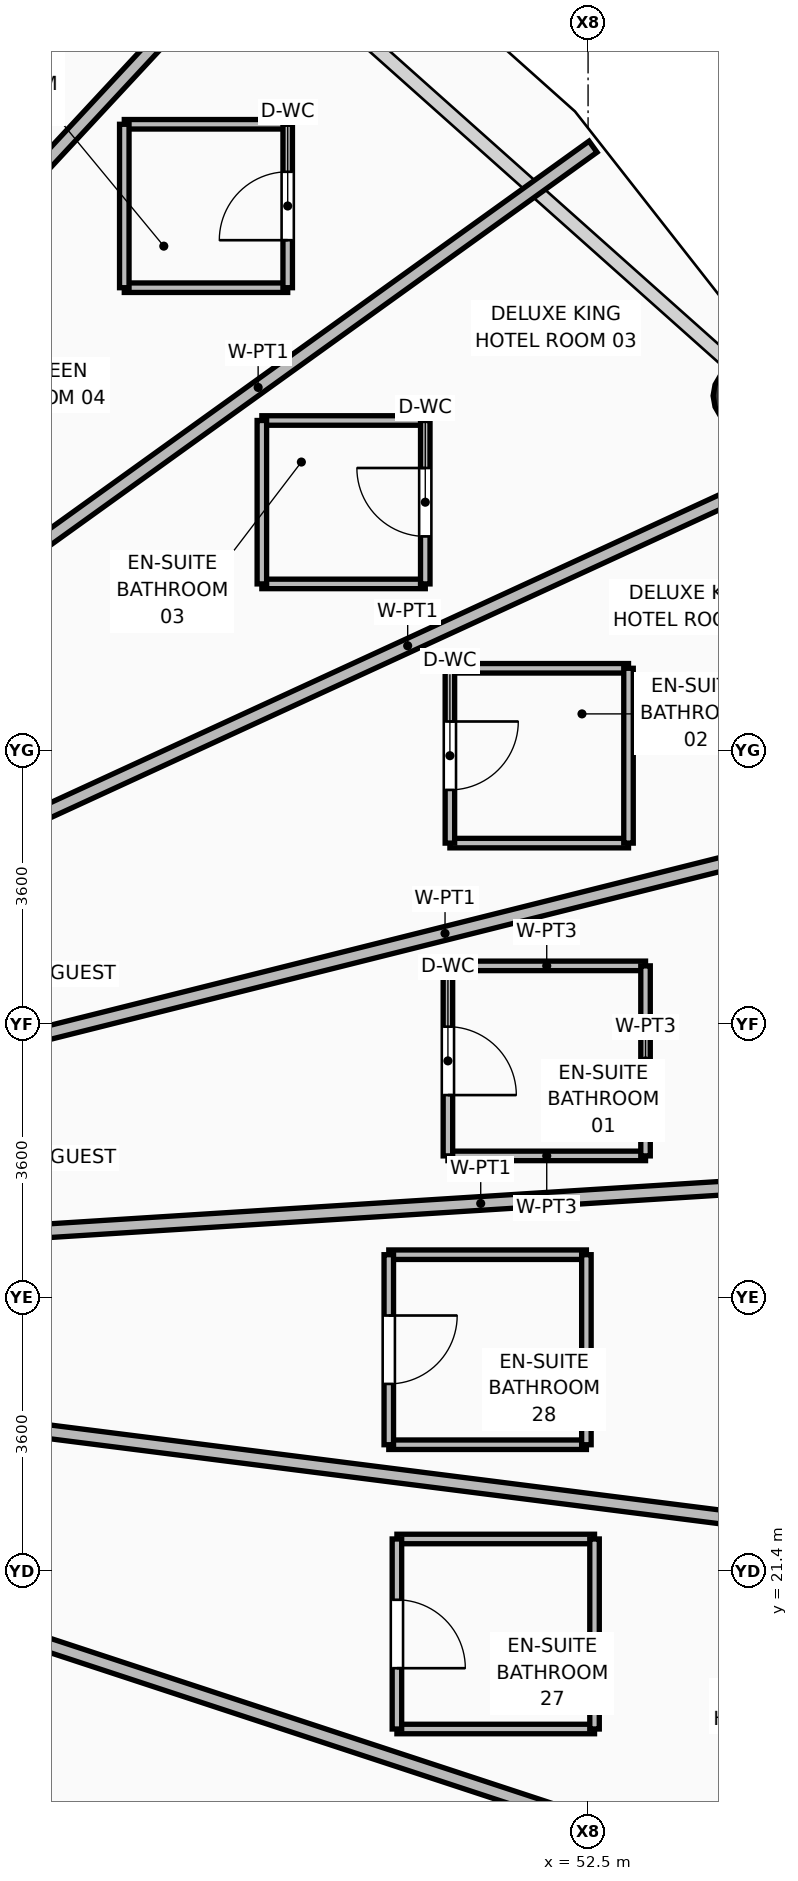
"""IFC4 building model, lengths in metres.
Left out: names, types, materials, properties, quantities, classifications, styles, units other than length and angle.
Written with IfcOpenShell. Run it as: python <this file> out.ifc"""

import sys

from ifc_helpers import new_model, si_unit, direction, frame, frame_2d, origin, origin_2d, place, context, subcontext, project, spatial, rectangle, hollow_circle, extrude, element, fill, save


model = new_model("IFC4")
c1 = context("Model", 3, precision=1e-05, world=origin(), true_north=direction((0.0, 1.0)))
c2 = subcontext(c1, "Body", "Model", "MODEL_VIEW")
j1 = project(units=[si_unit("LENGTHUNIT", "METRE"), si_unit("PLANEANGLEUNIT", "RADIAN")], contexts=[c1])
p1 = place(None, origin())
s1 = spatial("IfcSite", under=j1, at=p1, CompositionType="ELEMENT")
p2 = place(p1, origin())
s2 = spatial("IfcBuilding", under=s1, at=p2, CompositionType="ELEMENT")
p3 = place(p2, frame((0.0, 0.0, 53.25)))
s3 = spatial("IfcBuildingStorey", under=s2, at=p3, CompositionType="ELEMENT", Elevation=53.25)
p4 = place(p3, frame((54.57, 36.863, 0.0), z_axis=(0.192223999714, 0.099016391655, 0.976343017652), x_axis=(-0.45792701067, 0.888989793473, 0.0)))
e1 = element("IfcColumn", 1, at=p4, inside=s3, PredefinedType="COLUMN", context=c2, shape_type="SweptSolid", body=[
    extrude(hollow_circle(Radius=0.425, WallThickness=0.04, at=origin_2d()), origin(), (0.0, 0.0, 1.0), 3.656),
])
p5 = place(p3, frame((43.753, 25.774, 0.0), z_axis=(0.0, 0.0, 1.0), x_axis=(0.998009231822, 0.063068004547, 0.0)))
e2 = element("IfcWall", 2, at=p5, inside=s3, PredefinedType="PARTITIONING", context=c2, shape_type="SweptSolid", body=[
    extrude(rectangle(XDim=14.698, YDim=0.18, at=frame_2d((7.349, 0.0))), origin(), (0.0, 0.0, 1.0), 2.775),
])
p6 = place(p3, frame((43.753, 28.07, 0.0), z_axis=(0.0, 0.0, 1.0), x_axis=(0.970018590768, 0.243030725558, 0.0)))
e3 = element("IfcWall", 3, at=p6, inside=s3, PredefinedType="PARTITIONING", context=c2, shape_type="SweptSolid", body=[
    extrude(rectangle(XDim=14.154, YDim=0.18, at=frame_2d((7.077, 0.0))), origin(), (0.0, 0.0, 1.0), 2.775),
])
p7 = place(p3, frame((43.753, 30.64, 0.0), z_axis=(0.0, 0.0, 1.0), x_axis=(0.908354532473, 0.418200960466, 0.0)))
e4 = element("IfcWall", 4, at=p7, inside=s3, PredefinedType="PARTITIONING", context=c2, shape_type="SweptSolid", body=[
    extrude(rectangle(XDim=12.934, YDim=0.18, at=frame_2d((6.467, 0.0))), origin(), (0.0, 0.0, 1.0), 2.775),
])
p8 = place(p3, frame((43.753, 33.806, 0.0), z_axis=(0.0, 0.0, 1.0), x_axis=(0.812000044836, 0.583657371397, 0.0)))
e5 = element("IfcWall", 5, at=p8, inside=s3, PredefinedType="PARTITIONING", context=c2, shape_type="SweptSolid", body=[
    extrude(rectangle(XDim=10.852, YDim=0.18, at=frame_2d((5.426, 0.0))), origin(), (0.0, 0.0, 1.0), 2.775),
])
p9 = place(p3, frame((40.882, 35.103, 0.0), z_axis=(0.0, 0.0, 1.0), x_axis=(0.680551186201, 0.732700541122, 0.0)))
e6 = element("IfcWall", 6, at=p9, inside=s3, PredefinedType="PARTITIONING", context=c2, shape_type="SweptSolid", body=[
    extrude(rectangle(XDim=11.601, YDim=0.18, at=frame_2d((5.8, 0.0))), origin(), (0.0, 0.0, 1.0), 2.775),
])
p10 = place(p3, frame((43.753, 20.971, 0.0), z_axis=(0.0, 0.0, 1.0), x_axis=(0.949941417746, -0.312428076284, 0.0)))
e7 = element("IfcWall", 7, at=p10, inside=s3, PredefinedType="PARTITIONING", context=c2, shape_type="SweptSolid", body=[
    extrude(rectangle(XDim=13.849, YDim=0.18, at=frame_2d((6.925, 0.0))), origin(), (0.0, 0.0, 1.0), 2.775),
])
p11 = place(p3, frame((43.753, 23.444, 0.0), z_axis=(0.0, 0.0, 1.0), x_axis=(0.992038929139, -0.125931580921, 0.0)))
e8 = element("IfcWall", 8, at=p11, inside=s3, PredefinedType="PARTITIONING", context=c2, shape_type="SweptSolid", body=[
    extrude(rectangle(XDim=14.62, YDim=0.18, at=frame_2d((7.31, 0.0))), origin(), (0.0, 0.0, 1.0), 2.775),
])
for number, where, z_axis, x_axis in (
    (9, (50.656, 26.863, 0.0), (0.0, 0.0, 1.0), (1.0, 0.0, 0.0)),
    (10, (50.656, 29.363, 0.0), (0.0, 0.0, 1.0), (1.0, 0.0, 0.0)),
):
    element("IfcWall", number, at=place(p3, frame(where, z_axis=z_axis, x_axis=x_axis)), inside=s3, PredefinedType="PARTITIONING", context=c2, shape_type="SweptSolid", body=[
        extrude(rectangle(XDim=2.6, YDim=0.125, at=frame_2d((1.3, 0.0))), origin(), (0.0, 0.0, 1.0), 3.55),
    ])
p12 = place(p3, frame((50.656, 26.863, 0.0), z_axis=(0.0, 0.0, 1.0), x_axis=(0.0, 1.0, 0.0)))
e11 = element("IfcWall", 11, at=p12, inside=s3, PredefinedType="PARTITIONING", context=c2, shape_type="SweptSolid", body=[
    extrude(rectangle(XDim=2.5, YDim=0.125, at=frame_2d((1.25, 0.0))), origin(), (0.0, 0.0, 1.0), 3.55),
])
p13 = place(p12, frame((0.8, 0.0, 0.0)))
e12 = element("IfcOpeningElement", 12, at=p13, cuts=e11, PredefinedType="OPENING", context=c2, shape_type="SweptSolid", body=[
    extrude(rectangle(XDim=0.9, YDim=2.1, at=frame_2d((0.45, 1.05))), frame((0.0, 0.073, 0.0), z_axis=(0.0, -1.0, 0.0), x_axis=(1.0, 0.0, 0.0)), (0.0, 0.0, 1.0), 0.145),
])
p14 = place(p3, frame((53.256, 26.863, 0.0), z_axis=(0.0, 0.0, 1.0), x_axis=(0.0, 1.0, 0.0)))
e13 = element("IfcWall", 13, at=p14, inside=s3, PredefinedType="PARTITIONING", context=c2, shape_type="SweptSolid", body=[
    extrude(rectangle(XDim=2.5, YDim=0.125, at=frame_2d((1.25, 0.0))), origin(), (0.0, 0.0, 1.0), 3.55),
])
for number, where, z_axis, x_axis in (
    (14, (50.682, 30.978, 0.0), (0.0, 0.0, 1.0), (1.0, 0.0, 0.0)),
    (15, (50.682, 33.278, 0.0), (0.0, 0.0, 1.0), (1.0, 0.0, 0.0)),
):
    element("IfcWall", number, at=place(p3, frame(where, z_axis=z_axis, x_axis=x_axis)), inside=s3, PredefinedType="PARTITIONING", context=c2, shape_type="SweptSolid", body=[
        extrude(rectangle(XDim=2.35, YDim=0.125, at=frame_2d((1.175, 0.0))), origin(), (0.0, 0.0, 1.0), 3.55),
    ])
p15 = place(p3, frame((50.682, 30.978, 0.0), z_axis=(0.0, 0.0, 1.0), x_axis=(0.0, 1.0, 0.0)))
e16 = element("IfcWall", 16, at=p15, inside=s3, PredefinedType="PARTITIONING", context=c2, shape_type="SweptSolid", body=[
    extrude(rectangle(XDim=2.3, YDim=0.125, at=frame_2d((1.15, 0.0))), origin(), (0.0, 0.0, 1.0), 3.55),
])
p16 = place(p15, frame((0.7, 0.0, 0.0)))
e17 = element("IfcOpeningElement", 17, at=p16, cuts=e16, PredefinedType="OPENING", context=c2, shape_type="SweptSolid", body=[
    extrude(rectangle(XDim=0.9, YDim=2.1, at=frame_2d((0.45, 1.05))), frame((0.0, 0.073, 0.0), z_axis=(0.0, -1.0, 0.0), x_axis=(1.0, 0.0, 0.0)), (0.0, 0.0, 1.0), 0.145),
])
p17 = place(p3, frame((53.032, 30.978, 0.0), z_axis=(0.0, 0.0, 1.0), x_axis=(0.0, 1.0, 0.0)))
e18 = element("IfcWall", 18, at=p17, inside=s3, PredefinedType="PARTITIONING", context=c2, shape_type="SweptSolid", body=[
    extrude(rectangle(XDim=2.3, YDim=0.125, at=frame_2d((1.15, 0.0))), origin(), (0.0, 0.0, 1.0), 3.55),
])
for number, where, z_axis, x_axis in (
    (19, (48.208, 34.388, 0.0), (0.0, 0.0, 1.0), (1.0, 0.0, 0.0)),
    (20, (48.208, 36.538, 0.0), (0.0, 0.0, 1.0), (1.0, 0.0, 0.0)),
):
    element("IfcWall", number, at=place(p3, frame(where, z_axis=z_axis, x_axis=x_axis)), inside=s3, PredefinedType="PARTITIONING", context=c2, shape_type="SweptSolid", body=[
        extrude(rectangle(XDim=2.15, YDim=0.125, at=frame_2d((1.075, 0.0))), origin(), (0.0, 0.0, 1.0), 3.55),
    ])
p18 = place(p3, frame((48.208, 34.388, 0.0), z_axis=(0.0, 0.0, 1.0), x_axis=(0.0, 1.0, 0.0)))
e21 = element("IfcWall", 21, at=p18, inside=s3, PredefinedType="PARTITIONING", context=c2, shape_type="SweptSolid", body=[
    extrude(rectangle(XDim=2.15, YDim=0.125, at=frame_2d((1.075, 0.0))), origin(), (0.0, 0.0, 1.0), 2.928),
])
p19 = place(p3, frame((50.358, 34.388, 0.0), z_axis=(0.0, 0.0, 1.0), x_axis=(0.0, 1.0, 0.0)))
e22 = element("IfcWall", 22, at=p19, inside=s3, PredefinedType="PARTITIONING", context=c2, shape_type="SweptSolid", body=[
    extrude(rectangle(XDim=2.15, YDim=0.125, at=frame_2d((1.075, 0.0))), origin(), (0.0, 0.0, 1.0), 2.928),
])
p20 = place(p19, frame((0.625, 0.0, 0.0)))
e23 = element("IfcOpeningElement", 23, at=p20, cuts=e22, PredefinedType="OPENING", context=c2, shape_type="SweptSolid", body=[
    extrude(rectangle(XDim=0.9, YDim=2.1, at=frame_2d((0.45, 1.05))), frame((0.0, 0.073, 0.0), z_axis=(0.0, -1.0, 0.0), x_axis=(1.0, 0.0, 0.0)), (0.0, 0.0, 1.0), 0.145),
])
for number, where, z_axis, x_axis in (
    (24, (46.398, 38.285, 0.0), (0.0, 0.0, 1.0), (1.0, 0.0, 0.0)),
    (25, (46.398, 40.435, 0.0), (0.0, 0.0, 1.0), (1.0, 0.0, 0.0)),
    (26, (46.398, 38.285, 0.0), (0.0, 0.0, 1.0), (0.0, 1.0, 0.0)),
):
    element("IfcWall", number, at=place(p3, frame(where, z_axis=z_axis, x_axis=x_axis)), inside=s3, PredefinedType="PARTITIONING", context=c2, shape_type="SweptSolid", body=[
        extrude(rectangle(XDim=2.15, YDim=0.125, at=frame_2d((1.075, 0.0))), origin(), (0.0, 0.0, 1.0), 3.55),
    ])
p21 = place(p3, frame((48.548, 38.285, 0.0), z_axis=(0.0, 0.0, 1.0), x_axis=(0.0, 1.0, 0.0)))
e27 = element("IfcWall", 27, at=p21, inside=s3, PredefinedType="PARTITIONING", context=c2, shape_type="SweptSolid", body=[
    extrude(rectangle(XDim=2.15, YDim=0.125, at=frame_2d((1.075, 0.0))), origin(), (0.0, 0.0, 1.0), 3.55),
])
p22 = place(p21, frame((0.625, 0.0, 0.0)))
e28 = element("IfcOpeningElement", 28, at=p22, cuts=e27, PredefinedType="OPENING", context=c2, shape_type="SweptSolid", body=[
    extrude(rectangle(XDim=0.9, YDim=2.1, at=frame_2d((0.45, 1.05))), frame((0.0, 0.073, 0.0), z_axis=(0.0, -1.0, 0.0), x_axis=(1.0, 0.0, 0.0)), (0.0, 0.0, 1.0), 0.145),
])
for number, where, z_axis, x_axis in (
    (29, (49.985, 19.323, 0.0), (0.0, 0.0, 1.0), (1.0, 0.0, 0.0)),
    (30, (49.985, 21.823, 0.0), (0.0, 0.0, 1.0), (1.0, 0.0, 0.0)),
):
    element("IfcWall", number, at=place(p3, frame(where, z_axis=z_axis, x_axis=x_axis)), inside=s3, PredefinedType="PARTITIONING", context=c2, shape_type="SweptSolid", body=[
        extrude(rectangle(XDim=2.6, YDim=0.125, at=frame_2d((1.3, 0.0))), origin(), (0.0, 0.0, 1.0), 3.55),
    ])
p23 = place(p3, frame((49.985, 19.323, 0.0), z_axis=(0.0, 0.0, 1.0), x_axis=(0.0, 1.0, 0.0)))
e31 = element("IfcWall", 31, at=p23, inside=s3, PredefinedType="PARTITIONING", context=c2, shape_type="SweptSolid", body=[
    extrude(rectangle(XDim=2.5, YDim=0.125, at=frame_2d((1.25, 0.0))), origin(), (0.0, 0.0, 1.0), 3.55),
])
p24 = place(p23, frame((0.8, 0.0, 0.0)))
e32 = element("IfcOpeningElement", 32, at=p24, cuts=e31, PredefinedType="OPENING", context=c2, shape_type="SweptSolid", body=[
    extrude(rectangle(XDim=0.9, YDim=2.1, at=frame_2d((0.45, 1.05))), frame((0.0, 0.073, 0.0), z_axis=(0.0, -1.0, 0.0), x_axis=(1.0, 0.0, 0.0)), (0.0, 0.0, 1.0), 0.145),
])
p25 = place(p3, frame((52.585, 19.323, 0.0), z_axis=(0.0, 0.0, 1.0), x_axis=(0.0, 1.0, 0.0)))
e33 = element("IfcWall", 33, at=p25, inside=s3, PredefinedType="PARTITIONING", context=c2, shape_type="SweptSolid", body=[
    extrude(rectangle(XDim=2.5, YDim=0.125, at=frame_2d((1.25, 0.0))), origin(), (0.0, 0.0, 1.0), 3.55),
])
p26 = place(p3, frame((49.878, 23.063, 0.0), z_axis=(0.0, 0.0, 1.0), x_axis=(1.0, 0.0, 0.0)))
e34 = element("IfcWall", 34, at=p26, inside=s3, PredefinedType="PARTITIONING", context=c2, shape_type="SweptSolid", body=[
    extrude(rectangle(XDim=2.6, YDim=0.125, at=frame_2d((1.3, 0.0))), origin(), (0.0, 0.0, 1.0), 2.928),
])
p27 = place(p3, frame((49.878, 25.563, 0.0), z_axis=(0.0, 0.0, 1.0), x_axis=(1.0, 0.0, 0.0)))
e35 = element("IfcWall", 35, at=p27, inside=s3, PredefinedType="PARTITIONING", context=c2, shape_type="SweptSolid", body=[
    extrude(rectangle(XDim=2.6, YDim=0.125, at=frame_2d((1.3, 0.0))), origin(), (0.0, 0.0, 1.0), 3.55),
])
p28 = place(p3, frame((49.878, 23.063, 0.0), z_axis=(0.0, 0.0, 1.0), x_axis=(0.0, 1.0, 0.0)))
e36 = element("IfcWall", 36, at=p28, inside=s3, PredefinedType="PARTITIONING", context=c2, shape_type="SweptSolid", body=[
    extrude(rectangle(XDim=2.5, YDim=0.125, at=frame_2d((1.25, 0.0))), origin(), (0.0, 0.0, 1.0), 3.55),
])
p29 = place(p28, frame((0.8, 0.0, 0.0)))
e37 = element("IfcOpeningElement", 37, at=p29, cuts=e36, PredefinedType="OPENING", context=c2, shape_type="SweptSolid", body=[
    extrude(rectangle(XDim=0.9, YDim=2.1, at=frame_2d((0.45, 1.05))), frame((0.0, 0.073, 0.0), z_axis=(0.0, -1.0, 0.0), x_axis=(1.0, 0.0, 0.0)), (0.0, 0.0, 1.0), 0.145),
])
p30 = place(p3, frame((52.478, 23.063, 0.0), z_axis=(0.0, 0.0, 1.0), x_axis=(0.0, 1.0, 0.0)))
e38 = element("IfcWall", 38, at=p30, inside=s3, PredefinedType="PARTITIONING", context=c2, shape_type="SweptSolid", body=[
    extrude(rectangle(XDim=2.5, YDim=0.125, at=frame_2d((1.25, 0.0))), origin(), (0.0, 0.0, 1.0), 2.928),
])
p31 = place(p13, frame((0.9, 0.0, 0.0), z_axis=(0.0, 0.0, 1.0), x_axis=(-1.0, 0.0, 0.0)))
e39 = element("IfcDoor", 39, at=p31, inside=s3, OperationType="SINGLE_SWING_RIGHT", PredefinedType="DOOR", context=c2, shape_type="SweptSolid", body=[
    extrude(rectangle(XDim=0.9, YDim=2.1, at=frame_2d((0.45, 1.05))), frame((0.0, 0.025, 0.0), z_axis=(0.0, -1.0, 0.0), x_axis=(1.0, 0.0, 0.0)), (0.0, 0.0, 1.0), 0.05),
])
fill(e12, e39)
p32 = place(p16, frame((0.9, 0.0, 0.0), z_axis=(0.0, 0.0, 1.0), x_axis=(-1.0, 0.0, 0.0)))
e40 = element("IfcDoor", 40, at=p32, inside=s3, OperationType="SINGLE_SWING_LEFT", PredefinedType="DOOR", context=c2, shape_type="SweptSolid", body=[
    extrude(rectangle(XDim=0.9, YDim=2.1, at=frame_2d((0.45, 1.05))), frame((0.0, 0.025, 0.0), z_axis=(0.0, -1.0, 0.0), x_axis=(1.0, 0.0, 0.0)), (0.0, 0.0, 1.0), 0.05),
])
fill(e17, e40)
p33 = place(p20, origin())
e41 = element("IfcDoor", 41, at=p33, inside=s3, OperationType="SINGLE_SWING_RIGHT", PredefinedType="DOOR", context=c2, shape_type="SweptSolid", body=[
    extrude(rectangle(XDim=0.9, YDim=2.1, at=frame_2d((0.45, 1.05))), frame((0.0, 0.025, 0.0), z_axis=(0.0, -1.0, 0.0), x_axis=(1.0, 0.0, 0.0)), (0.0, 0.0, 1.0), 0.05),
])
fill(e23, e41)
p34 = place(p22, origin())
e42 = element("IfcDoor", 42, at=p34, inside=s3, OperationType="SINGLE_SWING_LEFT", PredefinedType="DOOR", context=c2, shape_type="SweptSolid", body=[
    extrude(rectangle(XDim=0.9, YDim=2.1, at=frame_2d((0.45, 1.05))), frame((0.0, 0.025, 0.0), z_axis=(0.0, -1.0, 0.0), x_axis=(1.0, 0.0, 0.0)), (0.0, 0.0, 1.0), 0.05),
])
fill(e28, e42)
p35 = place(p24, frame((0.9, 0.0, 0.0), z_axis=(0.0, 0.0, 1.0), x_axis=(-1.0, 0.0, 0.0)))
e43 = element("IfcDoor", 43, at=p35, inside=s3, OperationType="SINGLE_SWING_RIGHT", PredefinedType="DOOR", context=c2, shape_type="SweptSolid", body=[
    extrude(rectangle(XDim=0.9, YDim=2.1, at=frame_2d((0.45, 1.05))), frame((0.0, 0.025, 0.0), z_axis=(0.0, -1.0, 0.0), x_axis=(1.0, 0.0, 0.0)), (0.0, 0.0, 1.0), 0.05),
])
fill(e32, e43)
p36 = place(p29, frame((0.9, 0.0, 0.0), z_axis=(0.0, 0.0, 1.0), x_axis=(-1.0, 0.0, 0.0)))
e44 = element("IfcDoor", 44, at=p36, inside=s3, OperationType="SINGLE_SWING_LEFT", PredefinedType="DOOR", context=c2, shape_type="SweptSolid", body=[
    extrude(rectangle(XDim=0.9, YDim=2.1, at=frame_2d((0.45, 1.05))), frame((0.0, 0.025, 0.0), z_axis=(0.0, -1.0, 0.0), x_axis=(1.0, 0.0, 0.0)), (0.0, 0.0, 1.0), 0.05),
])
fill(e37, e44)
save(model, sys.argv[1])
